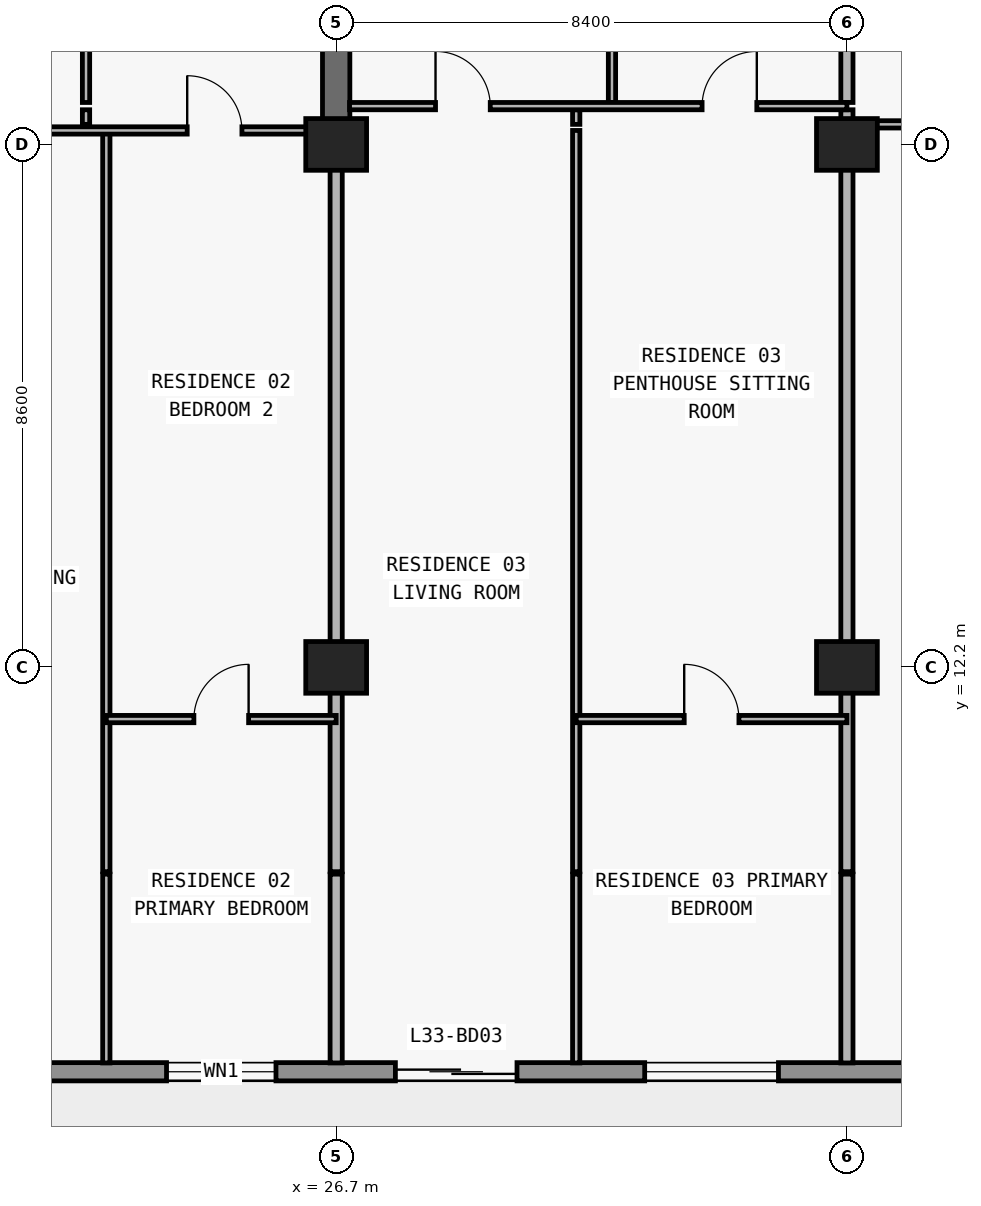
"""IFC4 building model, lengths in metres.
Left out: names, types, materials, properties, quantities, classifications, styles, units other than length and angle.
Written with IfcOpenShell. Run it as: python <this file> out.ifc"""

import sys

from ifc_helpers import new_model, si_unit, direction, frame, frame_2d, origin, origin_2d, place, context, subcontext, project, spatial, rectangle, extrude, element, fill, save


model = new_model("IFC4")
c1 = context("Model", 3, precision=1e-05, world=origin(), true_north=direction((0.0, 1.0)))
c2 = subcontext(c1, "Body", "Model", "MODEL_VIEW")
j1 = project(units=[si_unit("LENGTHUNIT", "METRE"), si_unit("PLANEANGLEUNIT", "RADIAN")], contexts=[c1])
p1 = place(None, origin())
s1 = spatial("IfcSite", under=j1, at=p1, CompositionType="ELEMENT")
p2 = place(p1, origin())
s2 = spatial("IfcBuilding", under=s1, at=p2, CompositionType="ELEMENT")
p3 = place(p2, frame((0.0, 0.0, 122.4)))
s3 = spatial("IfcBuildingStorey", under=s2, at=p3, CompositionType="ELEMENT", Elevation=122.4)
for number, where, z_axis, x_axis in (
    (1, (26.7, 12.2, 0.0), (0.0, 0.0, 1.0), (1.0, 0.0, 0.0)),
    (2, (35.1, 12.2, 0.0), (0.0, 0.0, 1.0), (1.0, 0.0, 0.0)),
    (3, (26.7, 20.8, 0.0), (0.0, 0.0, 1.0), (1.0, 0.0, 0.0)),
    (4, (35.1, 20.8, 0.0), (0.0, 0.0, 1.0), (1.0, 0.0, 0.0)),
):
    element("IfcColumn", number, at=place(p3, frame(where, z_axis=z_axis, x_axis=x_axis)), inside=s3, PredefinedType="COLUMN", context=c2, shape_type="SweptSolid", body=[
        extrude(rectangle(XDim=1.0, YDim=0.85, at=origin_2d()), origin(), (0.0, 0.0, 1.0), 3.05),
    ])
p4 = place(p3, frame((26.7, 20.8, 0.0), z_axis=(0.0, 0.0, 1.0), x_axis=(0.0, 1.0, 0.0)))
e5 = element("IfcWall", 5, at=p4, inside=s3, PredefinedType="SHEAR", context=c2, shape_type="SweptSolid", body=[
    extrude(rectangle(XDim=8.6, YDim=0.45, at=frame_2d((4.3, 0.0))), origin(), (0.0, 0.0, 1.0), 3.05),
])
p5 = place(p3, frame((70.1, 5.55, 0.0), z_axis=(0.0, 0.0, 1.0), x_axis=(-1.0, 0.0, 0.0)))
e6 = element("IfcWall", 6, at=p5, inside=s3, PredefinedType="STANDARD", context=c2, shape_type="SweptSolid", body=[
    extrude(rectangle(XDim=62.4, YDim=0.3, at=frame_2d((31.2, 0.0))), origin(), (0.0, 0.0, 1.0), 3.05),
])
p6 = place(p5, frame((57.226, 0.0, 0.0)))
e7 = element("IfcOpeningElement", 7, at=p6, cuts=e6, PredefinedType="OPENING", context=c2, shape_type="SweptSolid", body=[
    extrude(rectangle(XDim=2.0, YDim=2.3, at=frame_2d((1.0, 1.15))), frame((0.0, 0.16, 0.0), z_axis=(0.0, -1.0, 0.0), x_axis=(1.0, 0.0, 0.0)), (0.0, 0.0, 1.0), 0.32),
])
p7 = place(p5, frame((52.926, 0.0, 0.85)))
e8 = element("IfcOpeningElement", 8, at=p7, cuts=e6, PredefinedType="OPENING", context=c2, shape_type="SweptSolid", body=[
    extrude(rectangle(XDim=2.2, YDim=1.55, at=frame_2d((1.1, 0.775))), frame((0.0, 0.16, 0.0), z_axis=(0.0, -1.0, 0.0), x_axis=(1.0, 0.0, 0.0)), (0.0, 0.0, 1.0), 0.32),
])
p8 = place(p5, frame((48.49, 0.0, 0.0)))
e9 = element("IfcOpeningElement", 9, at=p8, cuts=e6, PredefinedType="OPENING", context=c2, shape_type="SweptSolid", body=[
    extrude(rectangle(XDim=2.0, YDim=2.3, at=frame_2d((1.0, 1.15))), frame((0.0, 0.16, 0.0), z_axis=(0.0, -1.0, 0.0), x_axis=(1.0, 0.0, 0.0)), (0.0, 0.0, 1.0), 0.32),
])
p9 = place(p5, frame((44.39, 0.0, 0.85)))
e10 = element("IfcOpeningElement", 10, at=p9, cuts=e6, PredefinedType="OPENING", context=c2, shape_type="SweptSolid", body=[
    extrude(rectangle(XDim=1.8, YDim=1.55, at=frame_2d((0.9, 0.775))), frame((0.0, 0.16, 0.0), z_axis=(0.0, -1.0, 0.0), x_axis=(1.0, 0.0, 0.0)), (0.0, 0.0, 1.0), 0.32),
])
p10 = place(p5, frame((40.426, 0.0, 0.0)))
e11 = element("IfcOpeningElement", 11, at=p10, cuts=e6, PredefinedType="OPENING", context=c2, shape_type="SweptSolid", body=[
    extrude(rectangle(XDim=2.0, YDim=2.3, at=frame_2d((1.0, 1.15))), frame((0.0, 0.16, 0.0), z_axis=(0.0, -1.0, 0.0), x_axis=(1.0, 0.0, 0.0)), (0.0, 0.0, 1.0), 0.32),
])
p11 = place(p5, frame((36.126, 0.0, 0.85)))
e12 = element("IfcOpeningElement", 12, at=p11, cuts=e6, PredefinedType="OPENING", context=c2, shape_type="SweptSolid", body=[
    extrude(rectangle(XDim=2.2, YDim=1.55, at=frame_2d((1.1, 0.775))), frame((0.0, 0.16, 0.0), z_axis=(0.0, -1.0, 0.0), x_axis=(1.0, 0.0, 0.0)), (0.0, 0.0, 1.0), 0.32),
])
p12 = place(p5, frame((31.91, 0.0, 0.0)))
e13 = element("IfcOpeningElement", 13, at=p12, cuts=e6, PredefinedType="OPENING", context=c2, shape_type="SweptSolid", body=[
    extrude(rectangle(XDim=2.0, YDim=2.3, at=frame_2d((1.0, 1.15))), frame((0.0, 0.16, 0.0), z_axis=(0.0, -1.0, 0.0), x_axis=(1.0, 0.0, 0.0)), (0.0, 0.0, 1.0), 0.32),
])
p13 = place(p5, frame((28.21, 0.0, 0.85)))
e14 = element("IfcOpeningElement", 14, at=p13, cuts=e6, PredefinedType="OPENING", context=c2, shape_type="SweptSolid", body=[
    extrude(rectangle(XDim=1.8, YDim=1.55, at=frame_2d((0.9, 0.775))), frame((0.0, 0.16, 0.0), z_axis=(0.0, -1.0, 0.0), x_axis=(1.0, 0.0, 0.0)), (0.0, 0.0, 1.0), 0.32),
])
p14 = place(p5, frame((24.426, 0.0, 0.0)))
e15 = element("IfcOpeningElement", 15, at=p14, cuts=e6, PredefinedType="OPENING", context=c2, shape_type="SweptSolid", body=[
    extrude(rectangle(XDim=2.0, YDim=2.3, at=frame_2d((1.0, 1.15))), frame((0.0, 0.16, 0.0), z_axis=(0.0, -1.0, 0.0), x_axis=(1.0, 0.0, 0.0)), (0.0, 0.0, 1.0), 0.32),
])
p15 = place(p5, frame((20.126, 0.0, 0.85)))
e16 = element("IfcOpeningElement", 16, at=p15, cuts=e6, PredefinedType="OPENING", context=c2, shape_type="SweptSolid", body=[
    extrude(rectangle(XDim=2.2, YDim=1.55, at=frame_2d((1.1, 0.775))), frame((0.0, 0.16, 0.0), z_axis=(0.0, -1.0, 0.0), x_axis=(1.0, 0.0, 0.0)), (0.0, 0.0, 1.0), 0.32),
])
p16 = place(p5, frame((15.69, 0.0, 0.0)))
e17 = element("IfcOpeningElement", 17, at=p16, cuts=e6, PredefinedType="OPENING", context=c2, shape_type="SweptSolid", body=[
    extrude(rectangle(XDim=2.0, YDim=2.3, at=frame_2d((1.0, 1.15))), frame((0.0, 0.16, 0.0), z_axis=(0.0, -1.0, 0.0), x_axis=(1.0, 0.0, 0.0)), (0.0, 0.0, 1.0), 0.32),
])
p17 = place(p5, frame((11.59, 0.0, 0.85)))
e18 = element("IfcOpeningElement", 18, at=p17, cuts=e6, PredefinedType="OPENING", context=c2, shape_type="SweptSolid", body=[
    extrude(rectangle(XDim=1.8, YDim=1.55, at=frame_2d((0.9, 0.775))), frame((0.0, 0.16, 0.0), z_axis=(0.0, -1.0, 0.0), x_axis=(1.0, 0.0, 0.0)), (0.0, 0.0, 1.0), 0.32),
])
p18 = place(p5, frame((7.626, 0.0, 0.0)))
e19 = element("IfcOpeningElement", 19, at=p18, cuts=e6, PredefinedType="OPENING", context=c2, shape_type="SweptSolid", body=[
    extrude(rectangle(XDim=2.0, YDim=2.3, at=frame_2d((1.0, 1.15))), frame((0.0, 0.16, 0.0), z_axis=(0.0, -1.0, 0.0), x_axis=(1.0, 0.0, 0.0)), (0.0, 0.0, 1.0), 0.32),
])
p19 = place(p5, frame((3.326, 0.0, 0.85)))
e20 = element("IfcOpeningElement", 20, at=p19, cuts=e6, PredefinedType="OPENING", context=c2, shape_type="SweptSolid", body=[
    extrude(rectangle(XDim=2.2, YDim=1.55, at=frame_2d((1.1, 0.775))), frame((0.0, 0.16, 0.0), z_axis=(0.0, -1.0, 0.0), x_axis=(1.0, 0.0, 0.0)), (0.0, 0.0, 1.0), 0.32),
])
p20 = place(p3, frame((22.586, 21.13, 0.0), z_axis=(0.0, 0.0, 1.0), x_axis=(0.0, 1.0, 0.0)))
e21 = element("IfcWall", 21, at=p20, inside=s3, PredefinedType="PARTITIONING", context=c2, shape_type="SweptSolid", body=[
    extrude(rectangle(XDim=0.24, YDim=0.12, at=frame_2d((0.12, 0.0))), origin(), (0.0, 0.0, 1.0), 2.486),
])
p21 = place(p3, frame((22.586, 21.49, 0.0), z_axis=(0.0, 0.0, 1.0), x_axis=(0.0, 1.0, 0.0)))
e22 = element("IfcWall", 22, at=p21, inside=s3, PredefinedType="PARTITIONING", context=c2, shape_type="SweptSolid", body=[
    extrude(rectangle(XDim=4.69, YDim=0.12, at=frame_2d((2.345, 0.0))), origin(), (0.0, 0.0, 1.0), 2.486),
])
p22 = place(p21, frame((1.895, 0.0, 0.0)))
e23 = element("IfcOpeningElement", 23, at=p22, cuts=e22, PredefinedType="OPENING", context=c2, shape_type="SweptSolid", body=[
    extrude(rectangle(XDim=0.9, YDim=2.15, at=frame_2d((0.45, 1.075))), frame((0.0, 0.07, 0.0), z_axis=(0.0, -1.0, 0.0), x_axis=(1.0, 0.0, 0.0)), (0.0, 0.0, 1.0), 0.14),
])
p23 = place(p3, frame((22.92, 5.695, 0.0), z_axis=(0.0, 0.0, 1.0), x_axis=(0.0, 1.0, 0.0)))
e24 = element("IfcWall", 24, at=p23, inside=s3, PredefinedType="PARTITIONING", context=c2, shape_type="SweptSolid", body=[
    extrude(rectangle(XDim=3.105, YDim=0.12, at=frame_2d((1.552, 0.0))), origin(), (0.0, 0.0, 1.0), 3.05),
])
p24 = place(p3, frame((22.92, 8.84, 0.0), z_axis=(0.0, 0.0, 1.0), x_axis=(0.0, 1.0, 0.0)))
e25 = element("IfcWall", 25, at=p24, inside=s3, PredefinedType="PARTITIONING", context=c2, shape_type="SweptSolid", body=[
    extrude(rectangle(XDim=12.19, YDim=0.12, at=frame_2d((6.095, 0.0))), origin(), (0.0, 0.0, 1.0), 3.05),
])
p25 = place(p3, frame((26.7, 5.695, 0.0), z_axis=(0.0, 0.0, 1.0), x_axis=(0.0, 1.0, 0.0)))
e26 = element("IfcWall", 26, at=p25, inside=s3, PredefinedType="PARTITIONING", context=c2, shape_type="SweptSolid", body=[
    extrude(rectangle(XDim=3.105, YDim=0.2, at=frame_2d((1.552, 0.0))), origin(), (0.0, 0.0, 1.0), 3.05),
])
p26 = place(p3, frame((26.7, 8.84, 0.0), z_axis=(0.0, 0.0, 1.0), x_axis=(0.0, 1.0, 0.0)))
e27 = element("IfcWall", 27, at=p26, inside=s3, PredefinedType="PARTITIONING", context=c2, shape_type="SweptSolid", body=[
    extrude(rectangle(XDim=11.955, YDim=0.2, at=frame_2d((5.978, 0.0))), origin(), (0.0, 0.0, 1.0), 2.174),
])
p27 = place(p3, frame((30.648, 5.695, 0.0), z_axis=(0.0, 0.0, 1.0), x_axis=(0.0, 1.0, 0.0)))
e28 = element("IfcWall", 28, at=p27, inside=s3, PredefinedType="PARTITIONING", context=c2, shape_type="SweptSolid", body=[
    extrude(rectangle(XDim=3.105, YDim=0.12, at=frame_2d((1.552, 0.0))), origin(), (0.0, 0.0, 1.0), 3.05),
])
p28 = place(p3, frame((30.648, 8.84, 0.0), z_axis=(0.0, 0.0, 1.0), x_axis=(0.0, 1.0, 0.0)))
e29 = element("IfcWall", 29, at=p28, inside=s3, PredefinedType="PARTITIONING", context=c2, shape_type="SweptSolid", body=[
    extrude(rectangle(XDim=12.19, YDim=0.12, at=frame_2d((6.095, 0.0))), origin(), (0.0, 0.0, 1.0), 3.05),
])
p29 = place(p3, frame((30.648, 21.13, 0.0), z_axis=(0.0, 0.0, 1.0), x_axis=(0.0, 1.0, 0.0)))
e30 = element("IfcWall", 30, at=p29, inside=s3, PredefinedType="PARTITIONING", context=c2, shape_type="SweptSolid", body=[
    extrude(rectangle(XDim=0.24, YDim=0.12, at=frame_2d((0.12, 0.0))), origin(), (0.0, 0.0, 1.0), 3.05),
])
p30 = place(p3, frame((31.236, 21.49, 0.0), z_axis=(0.0, 0.0, 1.0), x_axis=(0.0, 1.0, 0.0)))
e31 = element("IfcWall", 31, at=p30, inside=s3, PredefinedType="PARTITIONING", context=c2, shape_type="SweptSolid", body=[
    extrude(rectangle(XDim=4.69, YDim=0.12, at=frame_2d((2.345, 0.0))), origin(), (0.0, 0.0, 1.0), 3.05),
])
p31 = place(p30, frame((1.895, 0.0, 0.0)))
e32 = element("IfcOpeningElement", 32, at=p31, cuts=e31, PredefinedType="OPENING", context=c2, shape_type="SweptSolid", body=[
    extrude(rectangle(XDim=0.9, YDim=2.15, at=frame_2d((0.45, 1.075))), frame((0.0, 0.07, 0.0), z_axis=(0.0, -1.0, 0.0), x_axis=(1.0, 0.0, 0.0)), (0.0, 0.0, 1.0), 0.14),
])
p32 = place(p3, frame((35.1, 5.695, 0.0), z_axis=(0.0, 0.0, 1.0), x_axis=(0.0, 1.0, 0.0)))
e33 = element("IfcWall", 33, at=p32, inside=s3, PredefinedType="PARTITIONING", context=c2, shape_type="SweptSolid", body=[
    extrude(rectangle(XDim=3.105, YDim=0.2, at=frame_2d((1.552, 0.0))), origin(), (0.0, 0.0, 1.0), 3.05),
])
p33 = place(p3, frame((35.1, 8.84, 0.0), z_axis=(0.0, 0.0, 1.0), x_axis=(0.0, 1.0, 0.0)))
e34 = element("IfcWall", 34, at=p33, inside=s3, PredefinedType="PARTITIONING", context=c2, shape_type="SweptSolid", body=[
    extrude(rectangle(XDim=12.19, YDim=0.2, at=frame_2d((6.095, 0.0))), origin(), (0.0, 0.0, 1.0), 2.174),
])
p34 = place(p3, frame((35.1, 21.13, 0.0), z_axis=(0.0, 0.0, 1.0), x_axis=(0.0, 1.0, 0.0)))
e35 = element("IfcWall", 35, at=p34, inside=s3, PredefinedType="PARTITIONING", context=c2, shape_type="SweptSolid", body=[
    extrude(rectangle(XDim=0.24, YDim=0.2, at=frame_2d((0.12, 0.0))), origin(), (0.0, 0.0, 1.0), 2.174),
])
p35 = place(p3, frame((35.1, 21.49, 0.0), z_axis=(0.0, 0.0, 1.0), x_axis=(0.0, 1.0, 0.0)))
e36 = element("IfcWall", 36, at=p35, inside=s3, PredefinedType="PARTITIONING", context=c2, shape_type="SweptSolid", body=[
    extrude(rectangle(XDim=4.69, YDim=0.2, at=frame_2d((2.345, 0.0))), origin(), (0.0, 0.0, 1.0), 2.174),
])
p36 = place(p3, frame((22.92, 11.35, 0.0), z_axis=(0.0, 0.0, 1.0), x_axis=(1.0, 0.0, 0.0)))
e37 = element("IfcWall", 37, at=p36, inside=s3, PredefinedType="PARTITIONING", context=c2, shape_type="SweptSolid", body=[
    extrude(rectangle(XDim=3.78, YDim=0.12, at=frame_2d((1.89, 0.0))), origin(), (0.0, 0.0, 1.0), 3.05),
])
p37 = place(p36, frame((1.44, 0.0, 0.0)))
e38 = element("IfcOpeningElement", 38, at=p37, cuts=e37, PredefinedType="OPENING", context=c2, shape_type="SweptSolid", body=[
    extrude(rectangle(XDim=0.9, YDim=2.15, at=frame_2d((0.45, 1.075))), frame((0.0, 0.07, 0.0), z_axis=(0.0, -1.0, 0.0), x_axis=(1.0, 0.0, 0.0)), (0.0, 0.0, 1.0), 0.14),
])
p38 = place(p3, frame((30.648, 11.35, 0.0), z_axis=(0.0, 0.0, 1.0), x_axis=(1.0, 0.0, 0.0)))
e39 = element("IfcWall", 39, at=p38, inside=s3, PredefinedType="PARTITIONING", context=c2, shape_type="SweptSolid", body=[
    extrude(rectangle(XDim=4.452, YDim=0.12, at=frame_2d((2.226, 0.0))), origin(), (0.0, 0.0, 1.0), 3.05),
])
p39 = place(p38, frame((1.776, 0.0, 0.0)))
e40 = element("IfcOpeningElement", 40, at=p39, cuts=e39, PredefinedType="OPENING", context=c2, shape_type="SweptSolid", body=[
    extrude(rectangle(XDim=0.9, YDim=2.15, at=frame_2d((0.45, 1.075))), frame((0.0, 0.07, 0.0), z_axis=(0.0, -1.0, 0.0), x_axis=(1.0, 0.0, 0.0)), (0.0, 0.0, 1.0), 0.14),
])
p40 = place(p3, frame((18.3, 21.03, 0.0), z_axis=(0.0, 0.0, 1.0), x_axis=(1.0, 0.0, 0.0)))
e41 = element("IfcWall", 41, at=p40, inside=s3, PredefinedType="PARTITIONING", context=c2, shape_type="SweptSolid", body=[
    extrude(rectangle(XDim=8.18, YDim=0.12, at=frame_2d((4.09, 0.0))), origin(), (0.0, 0.0, 1.0), 2.174),
])
p41 = place(p40, frame((1.693, 0.0, 0.0)))
e42 = element("IfcOpeningElement", 42, at=p41, cuts=e41, PredefinedType="OPENING", context=c2, shape_type="SweptSolid", body=[
    extrude(rectangle(XDim=0.9, YDim=2.124, at=frame_2d((0.45, 1.062))), frame((0.0, 0.07, 0.0), z_axis=(0.0, -1.0, 0.0), x_axis=(1.0, 0.0, 0.0)), (0.0, 0.0, 1.0), 0.14),
])
p42 = place(p40, frame((5.95, 0.0, 0.0)))
e43 = element("IfcOpeningElement", 43, at=p42, cuts=e41, PredefinedType="OPENING", context=c2, shape_type="SweptSolid", body=[
    extrude(rectangle(XDim=0.9, YDim=2.124, at=frame_2d((0.45, 1.062))), frame((0.0, 0.07, 0.0), z_axis=(0.0, -1.0, 0.0), x_axis=(1.0, 0.0, 0.0)), (0.0, 0.0, 1.0), 0.14),
])
p43 = place(p3, frame((35.1, 21.13, 0.0), z_axis=(0.0, 0.0, 1.0), x_axis=(1.0, 0.0, 0.0)))
e44 = element("IfcWall", 44, at=p43, inside=s3, PredefinedType="PARTITIONING", context=c2, shape_type="SweptSolid", body=[
    extrude(rectangle(XDim=7.6, YDim=0.12, at=frame_2d((3.8, 0.0))), origin(), (0.0, 0.0, 1.0), 2.174),
])
p44 = place(p43, frame((1.64, 0.0, 0.0)))
e45 = element("IfcOpeningElement", 45, at=p44, cuts=e44, PredefinedType="OPENING", context=c2, shape_type="SweptSolid", body=[
    extrude(rectangle(XDim=0.9, YDim=2.124, at=frame_2d((0.45, 1.062))), frame((0.0, 0.07, 0.0), z_axis=(0.0, -1.0, 0.0), x_axis=(1.0, 0.0, 0.0)), (0.0, 0.0, 1.0), 0.14),
])
p45 = place(p43, frame((5.527, 0.0, 0.0)))
e46 = element("IfcOpeningElement", 46, at=p45, cuts=e44, PredefinedType="OPENING", context=c2, shape_type="SweptSolid", body=[
    extrude(rectangle(XDim=0.9, YDim=2.124, at=frame_2d((0.45, 1.062))), frame((0.0, 0.07, 0.0), z_axis=(0.0, -1.0, 0.0), x_axis=(1.0, 0.0, 0.0)), (0.0, 0.0, 1.0), 0.14),
])
p46 = place(p3, frame((26.92, 21.43, 0.0), z_axis=(0.0, 0.0, 1.0), x_axis=(1.0, 0.0, 0.0)))
e47 = element("IfcWall", 47, at=p46, inside=s3, PredefinedType="PARTITIONING", context=c2, shape_type="SweptSolid", body=[
    extrude(rectangle(XDim=8.18, YDim=0.12, at=frame_2d((4.09, 0.0))), origin(), (0.0, 0.0, 1.0), 3.05),
])
p47 = place(p46, frame((1.414, 0.0, 0.0)))
e48 = element("IfcOpeningElement", 48, at=p47, cuts=e47, PredefinedType="OPENING", context=c2, shape_type="SweptSolid", body=[
    extrude(rectangle(XDim=0.9, YDim=2.15, at=frame_2d((0.45, 1.075))), frame((0.0, 0.07, 0.0), z_axis=(0.0, -1.0, 0.0), x_axis=(1.0, 0.0, 0.0)), (0.0, 0.0, 1.0), 0.14),
])
p48 = place(p46, frame((5.798, 0.0, 0.0)))
e49 = element("IfcOpeningElement", 49, at=p48, cuts=e47, PredefinedType="OPENING", context=c2, shape_type="SweptSolid", body=[
    extrude(rectangle(XDim=0.9, YDim=2.15, at=frame_2d((0.45, 1.075))), frame((0.0, 0.07, 0.0), z_axis=(0.0, -1.0, 0.0), x_axis=(1.0, 0.0, 0.0)), (0.0, 0.0, 1.0), 0.14),
])
p49 = place(p9, origin())
e50 = element("IfcWindow", 50, at=p49, inside=s3, PartitioningType="SINGLE_PANEL", PredefinedType="WINDOW", context=c2, shape_type="SweptSolid", body=[
    extrude(rectangle(XDim=1.8, YDim=1.55, at=frame_2d((0.9, 0.775))), frame((0.0, 0.03, 0.0), z_axis=(0.0, -1.0, 0.0), x_axis=(1.0, 0.0, 0.0)), (0.0, 0.0, 1.0), 0.06),
])
fill(e10, e50)
p50 = place(p10, origin())
e51 = element("IfcDoor", 51, at=p50, inside=s3, OperationType="DOUBLE_DOOR_SLIDING", PredefinedType="DOOR", context=c2, shape_type="SweptSolid", body=[
    extrude(rectangle(XDim=2.0, YDim=2.3, at=frame_2d((1.0, 1.15))), frame((0.0, 0.025, 0.0), z_axis=(0.0, -1.0, 0.0), x_axis=(1.0, 0.0, 0.0)), (0.0, 0.0, 1.0), 0.05),
])
fill(e11, e51)
p51 = place(p11, origin())
e52 = element("IfcWindow", 52, at=p51, inside=s3, PartitioningType="SINGLE_PANEL", PredefinedType="WINDOW", context=c2, shape_type="SweptSolid", body=[
    extrude(rectangle(XDim=2.2, YDim=1.55, at=frame_2d((1.1, 0.775))), frame((0.0, 0.03, 0.0), z_axis=(0.0, -1.0, 0.0), x_axis=(1.0, 0.0, 0.0)), (0.0, 0.0, 1.0), 0.06),
])
fill(e12, e52)
p52 = place(p42, origin())
e53 = element("IfcDoor", 53, at=p52, inside=s3, OperationType="SINGLE_SWING_LEFT", PredefinedType="DOOR", context=c2, shape_type="SweptSolid", body=[
    extrude(rectangle(XDim=0.9, YDim=2.124, at=frame_2d((0.45, 1.062))), frame((0.0, 0.025, 0.0), z_axis=(0.0, -1.0, 0.0), x_axis=(1.0, 0.0, 0.0)), (0.0, 0.0, 1.0), 0.05),
])
fill(e43, e53)
p53 = place(p37, origin())
e54 = element("IfcDoor", 54, at=p53, inside=s3, OperationType="SINGLE_SWING_RIGHT", PredefinedType="DOOR", context=c2, shape_type="SweptSolid", body=[
    extrude(rectangle(XDim=0.9, YDim=2.15, at=frame_2d((0.45, 1.075))), frame((0.0, 0.025, 0.0), z_axis=(0.0, -1.0, 0.0), x_axis=(1.0, 0.0, 0.0)), (0.0, 0.0, 1.0), 0.05),
])
fill(e38, e54)
p54 = place(p47, origin())
e55 = element("IfcDoor", 55, at=p54, inside=s3, OperationType="SINGLE_SWING_LEFT", PredefinedType="DOOR", context=c2, shape_type="SweptSolid", body=[
    extrude(rectangle(XDim=0.9, YDim=2.15, at=frame_2d((0.45, 1.075))), frame((0.0, 0.025, 0.0), z_axis=(0.0, -1.0, 0.0), x_axis=(1.0, 0.0, 0.0)), (0.0, 0.0, 1.0), 0.05),
])
fill(e48, e55)
p55 = place(p48, origin())
e56 = element("IfcDoor", 56, at=p55, inside=s3, OperationType="SINGLE_SWING_RIGHT", PredefinedType="DOOR", context=c2, shape_type="SweptSolid", body=[
    extrude(rectangle(XDim=0.9, YDim=2.15, at=frame_2d((0.45, 1.075))), frame((0.0, 0.025, 0.0), z_axis=(0.0, -1.0, 0.0), x_axis=(1.0, 0.0, 0.0)), (0.0, 0.0, 1.0), 0.05),
])
fill(e49, e56)
p56 = place(p39, origin())
e57 = element("IfcDoor", 57, at=p56, inside=s3, OperationType="SINGLE_SWING_LEFT", PredefinedType="DOOR", context=c2, shape_type="SweptSolid", body=[
    extrude(rectangle(XDim=0.9, YDim=2.15, at=frame_2d((0.45, 1.075))), frame((0.0, 0.025, 0.0), z_axis=(0.0, -1.0, 0.0), x_axis=(1.0, 0.0, 0.0)), (0.0, 0.0, 1.0), 0.05),
])
fill(e40, e57)
save(model, sys.argv[1])
